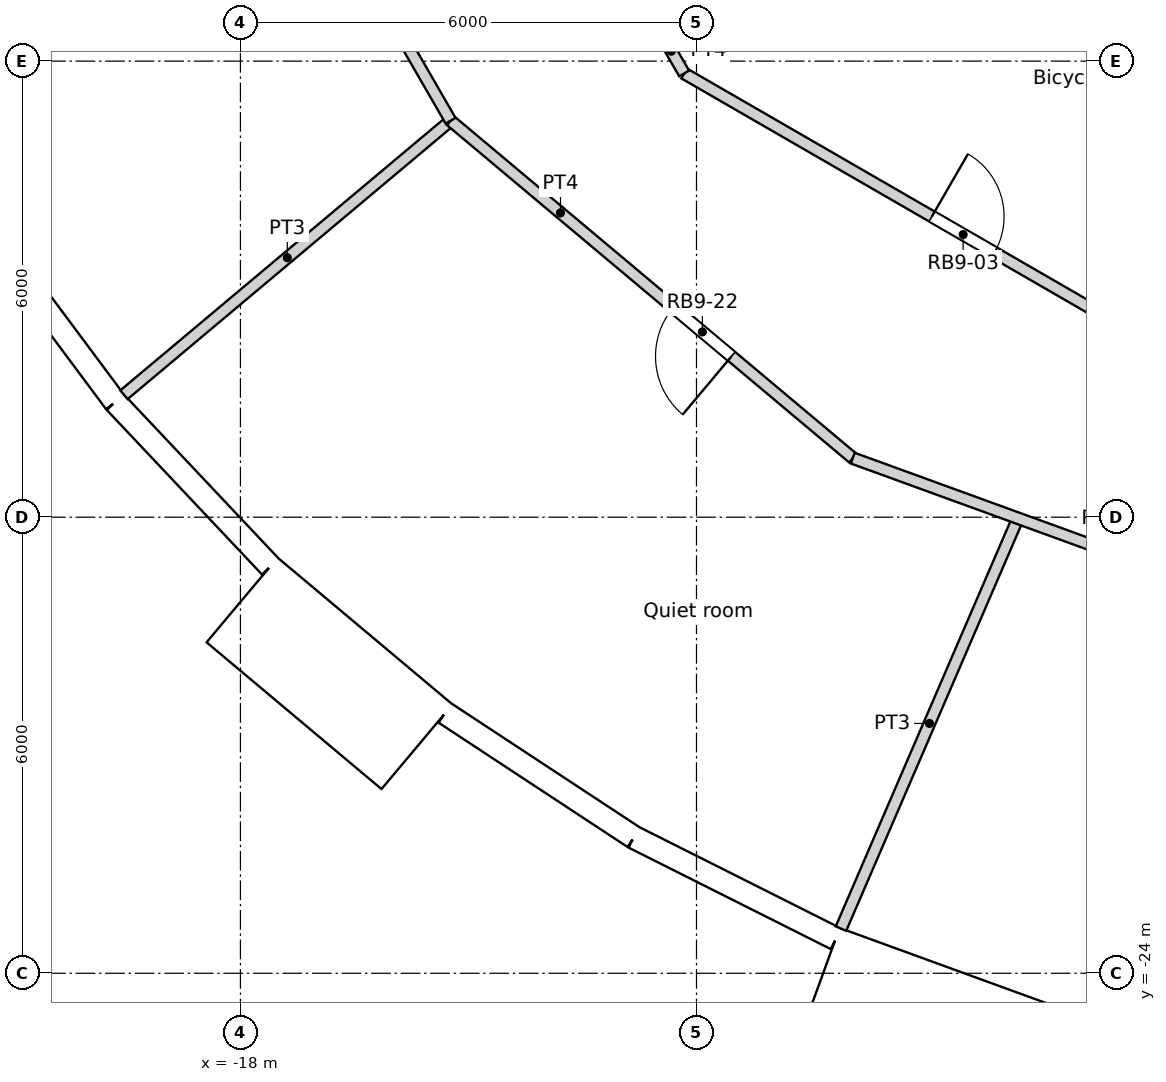
"""IFC4 building model, lengths in metres.
Left out: names, types, materials, properties, quantities, classifications, styles, units other than length and angle.
Written with IfcOpenShell. Run it as: python <this file> out.ifc"""

import sys

from ifc_helpers import new_model, si_unit, direction, frame, frame_2d, origin, origin_2d, place, context, subcontext, project, spatial, rectangle, circle, extrude, element, fill, save


model = new_model("IFC4")
c1 = context("Model", 3, precision=1e-05, world=origin(), true_north=direction((0.0, 1.0)))
c2 = subcontext(c1, "Body", "Model", "MODEL_VIEW")
j1 = project(units=[si_unit("LENGTHUNIT", "METRE"), si_unit("PLANEANGLEUNIT", "RADIAN")], contexts=[c1])
p1 = place(None, origin())
s1 = spatial("IfcSite", under=j1, at=p1, CompositionType="ELEMENT")
p2 = place(p1, origin())
s2 = spatial("IfcBuilding", under=s1, at=p2, CompositionType="ELEMENT")
p3 = place(p2, frame((0.0, 0.0, 212.4)))
s3 = spatial("IfcBuildingStorey", under=s2, at=p3, CompositionType="ELEMENT", Elevation=212.4)
for number, where, z_axis, x_axis in (
    (1, (-20.509, -13.489, 0.0), (0.0, 0.0, 1.0), (1.0, 0.0, 0.0)),
    (2, (-16.846, -17.855, 0.0), (0.0, 0.0, 1.0), (1.0, 0.0, 0.0)),
    (3, (-12.274, -21.259, 0.0), (0.0, 0.0, 1.0), (1.0, 0.0, 0.0)),
    (4, (-7.04, -23.516, 0.0), (0.0, 0.0, 1.0), (1.0, 0.0, 0.0)),
):
    element("IfcColumn", number, at=place(p3, frame(where, z_axis=z_axis, x_axis=x_axis)), inside=s3, PredefinedType="COLUMN", context=c2, shape_type="SweptSolid", body=[
        extrude(circle(Radius=0.6, at=origin_2d()), origin(), (0.0, 0.0, 1.0), 3.6),
    ])
for number, where, z_axis, x_axis in (
    (5, (-13.798, -12.802, 0.0), (0.0, 0.0, 1.0), (1.0, 0.0, 0.0)),
    (6, (-9.411, -16.301, 0.0), (0.0, 0.0, 1.0), (1.0, 0.0, 0.0)),
):
    element("IfcColumn", number, at=place(p3, frame(where, z_axis=z_axis, x_axis=x_axis)), inside=s3, PredefinedType="COLUMN", context=c2, shape_type="SweptSolid", body=[
        extrude(circle(Radius=0.65, at=origin_2d()), origin(), (0.0, 0.0, 1.0), 3.6),
    ])
p4 = place(p3, frame((-21.422, -14.101, 0.0), z_axis=(0.0, 0.0, 1.0), x_axis=(0.597197580538, -0.80209416517, 0.0)))
e7 = element("IfcWall", 7, at=p4, inside=s3, PredefinedType="SOLIDWALL", context=c2, shape_type="SweptSolid", body=[
    extrude(rectangle(XDim=2.973, YDim=0.3, at=frame_2d((1.486, 0.0))), origin(), (0.0, 0.0, 1.0), 3.3),
])
p5 = place(p4, frame((1.486, 0.0, 1.55)))
e8 = element("IfcOpeningElement", 8, at=p5, cuts=e7, PredefinedType="OPENING", context=c2, shape_type="SweptSolid", body=[
    extrude(circle(Radius=0.9, at=origin_2d()), frame((0.0, 0.16, 0.0), z_axis=(0.0, -1.0, 0.0), x_axis=(1.0, 0.0, 0.0)), (0.0, 0.0, 1.0), 0.32),
])
p6 = place(p3, frame((-19.647, -16.486, 0.0), z_axis=(0.0, 0.0, 1.0), x_axis=(0.686235184166, -0.727379730273, 0.0)))
e9 = element("IfcWall", 9, at=p6, inside=s3, PredefinedType="SOLIDWALL", context=c2, shape_type="SweptSolid", body=[
    extrude(rectangle(XDim=2.973, YDim=0.3, at=frame_2d((1.486, 0.0))), origin(), (0.0, 0.0, 1.0), 3.3),
])
p7 = place(p6, frame((1.486, 0.0, 1.55)))
e10 = element("IfcOpeningElement", 10, at=p7, cuts=e9, PredefinedType="OPENING", context=c2, shape_type="SweptSolid", body=[
    extrude(circle(Radius=0.9, at=origin_2d()), frame((0.0, 0.16, 0.0), z_axis=(0.0, -1.0, 0.0), x_axis=(1.0, 0.0, 0.0)), (0.0, 0.0, 1.0), 0.32),
])
p8 = place(p3, frame((-17.977, -19.09, -0.3), z_axis=(0.0, 0.0, 1.0), x_axis=(0.766022196139, -0.642814121673, 0.0)))
e11 = element("IfcWall", 11, at=p8, inside=s3, PredefinedType="ELEMENTEDWALL", context=c2, shape_type="SweptSolid", body=[
    extrude(rectangle(XDim=3.0, YDim=1.45, at=frame_2d((1.5, 0.0))), origin(), (0.0, 0.0, 1.0), 3.6),
])
p9 = place(p8, frame((1.5, 0.0, 1.85)))
e12 = element("IfcOpeningElement", 12, at=p9, cuts=e11, PredefinedType="OPENING", context=c2, shape_type="SweptSolid", body=[
    extrude(circle(Radius=0.9, at=origin_2d()), frame((0.0, 0.735, 0.0), z_axis=(0.0, -1.0, 0.0), x_axis=(1.0, 0.0, 0.0)), (0.0, 0.0, 1.0), 1.47),
])
p10 = place(p3, frame((-15.308, -20.578, 0.0), z_axis=(0.0, 0.0, 1.0), x_axis=(0.835470659512, -0.549535055382, 0.0)))
e13 = element("IfcWall", 13, at=p10, inside=s3, PredefinedType="SOLIDWALL", context=c2, shape_type="SweptSolid", body=[
    extrude(rectangle(XDim=2.973, YDim=0.3, at=frame_2d((1.487, 0.0))), origin(), (0.0, 0.0, 1.0), 3.3),
])
p11 = place(p10, frame((1.486, 0.0, 1.55)))
e14 = element("IfcOpeningElement", 14, at=p11, cuts=e13, PredefinedType="OPENING", context=c2, shape_type="SweptSolid", body=[
    extrude(circle(Radius=0.9, at=origin_2d()), frame((0.0, 0.16, 0.0), z_axis=(0.0, -1.0, 0.0), x_axis=(1.0, 0.0, 0.0)), (0.0, 0.0, 1.0), 0.32),
])
p12 = place(p3, frame((-12.824, -22.211, 0.0), z_axis=(0.0, 0.0, 1.0), x_axis=(0.893637442555, -0.448789618045, 0.0)))
e15 = element("IfcWall", 15, at=p12, inside=s3, PredefinedType="SOLIDWALL", context=c2, shape_type="SweptSolid", body=[
    extrude(rectangle(XDim=2.973, YDim=0.3, at=frame_2d((1.486, 0.0))), origin(), (0.0, 0.0, 1.0), 3.3),
])
p13 = place(p12, frame((1.486, 0.0, 1.55)))
e16 = element("IfcOpeningElement", 16, at=p13, cuts=e15, PredefinedType="OPENING", context=c2, shape_type="SweptSolid", body=[
    extrude(circle(Radius=0.9, at=origin_2d()), frame((0.0, 0.16, 0.0), z_axis=(0.0, -1.0, 0.0), x_axis=(1.0, 0.0, 0.0)), (0.0, 0.0, 1.0), 0.32),
])
p14 = place(p3, frame((-10.363, -24.087, -0.3), z_axis=(0.0, 0.0, 1.0), x_axis=(0.939686455819, -0.342037080957, 0.0)))
e17 = element("IfcWall", 17, at=p14, inside=s3, PredefinedType="ELEMENTEDWALL", context=c2, shape_type="SweptSolid", body=[
    extrude(rectangle(XDim=3.0, YDim=1.45, at=frame_2d((1.5, 0.0))), origin(), (0.0, 0.0, 1.0), 3.6),
])
p15 = place(p14, frame((1.5, 0.0, 1.85)))
e18 = element("IfcOpeningElement", 18, at=p15, cuts=e17, PredefinedType="OPENING", context=c2, shape_type="SweptSolid", body=[
    extrude(circle(Radius=0.9, at=origin_2d()), frame((0.0, 0.735, 0.0), z_axis=(0.0, -1.0, 0.0), x_axis=(1.0, 0.0, 0.0)), (0.0, 0.0, 1.0), 1.47),
])
p16 = place(p3, frame((-12.5, -11.577, 0.0), z_axis=(0.0, 0.0, 1.0), x_axis=(0.500024767483, -0.866011103799, 0.0)))
e19 = element("IfcWall", 19, at=p16, inside=s3, PredefinedType="PARTITIONING", context=c2, shape_type="SweptSolid", body=[
    extrude(rectangle(XDim=0.676, YDim=0.15, at=frame_2d((0.338, 0.0))), origin(), (0.0, 0.0, 1.0), 3.15),
])
p17 = place(p3, frame((-18.688, -6.802, 0.0), z_axis=(0.0, 0.0, 1.0), x_axis=(0.499914202267, -0.866074933462, 0.0)))
e20 = element("IfcWall", 20, at=p17, inside=s3, PredefinedType="PARTITIONING", context=c2, shape_type="SweptSolid", body=[
    extrude(rectangle(XDim=6.907, YDim=0.15, at=frame_2d((3.454, 0.0))), origin(), (0.0, 0.0, 1.0), 3.15),
])
p18 = place(p17, frame((3.003, 0.0, 0.0)))
e21 = element("IfcOpeningElement", 21, at=p18, cuts=e20, PredefinedType="OPENING", context=c2, shape_type="SweptSolid", body=[
    extrude(rectangle(XDim=1.8, YDim=2.1, at=frame_2d((0.9, 1.05))), frame((0.0, 0.075, 0.0), z_axis=(0.0, -1.0, 0.0), x_axis=(1.0, 0.0, 0.0)), (0.0, 0.0, 1.0), 0.15),
])
p19 = place(p3, frame((-15.235, -12.784, 0.0), z_axis=(0.0, 0.0, 1.0), x_axis=(0.766192104565, -0.642611592567, 0.0)))
e22 = element("IfcWall", 22, at=p19, inside=s3, PredefinedType="PARTITIONING", context=c2, shape_type="SweptSolid", body=[
    extrude(rectangle(XDim=6.906, YDim=0.15, at=frame_2d((3.453, 0.0))), origin(), (0.0, 0.0, 1.0), 3.15),
])
p20 = place(p19, frame((3.823, 0.0, 0.0)))
e23 = element("IfcOpeningElement", 23, at=p20, cuts=e22, PredefinedType="OPENING", context=c2, shape_type="SweptSolid", body=[
    extrude(rectangle(XDim=1.0, YDim=2.04, at=frame_2d((0.5, 1.02))), frame((0.0, 0.075, 0.0), z_axis=(0.0, -1.0, 0.0), x_axis=(1.0, 0.0, 0.0)), (0.0, 0.0, 1.0), 0.15),
])
p21 = place(p3, frame((-12.162, -12.162, 0.0), z_axis=(0.0, 0.0, 1.0), x_axis=(0.866004766557, -0.500035743023, 0.0)))
e24 = element("IfcWall", 24, at=p21, inside=s3, PredefinedType="PARTITIONING", context=c2, shape_type="SweptSolid", body=[
    extrude(rectangle(XDim=8.477, YDim=0.15, at=frame_2d((4.239, 0.0))), origin(), (0.0, 0.0, 1.0), 3.15),
])
p22 = place(p21, frame((3.763, 0.0, 0.0)))
e25 = element("IfcOpeningElement", 25, at=p22, cuts=e24, PredefinedType="OPENING", context=c2, shape_type="SweptSolid", body=[
    extrude(rectangle(XDim=0.95, YDim=2.1, at=frame_2d((0.475, 1.05))), frame((0.0, 0.075, 0.0), z_axis=(0.0, -1.0, 0.0), x_axis=(1.0, 0.0, 0.0)), (0.0, 0.0, 1.0), 0.15),
])
p23 = place(p3, frame((-9.944, -17.223, 0.0), z_axis=(0.0, 0.0, 1.0), x_axis=(0.939737689664, -0.341896292208, 0.0)))
e26 = element("IfcWall", 26, at=p23, inside=s3, PredefinedType="PARTITIONING", context=c2, shape_type="SweptSolid", body=[
    extrude(rectangle(XDim=6.908, YDim=0.15, at=frame_2d((3.454, 0.0))), origin(), (0.0, 0.0, 1.0), 3.15),
])
p24 = place(p3, frame((-19.532, -16.389, 0.0), z_axis=(0.0, 0.0, 1.0), x_axis=(0.76609059793, 0.642732600514, 0.0)))
e27 = element("IfcWall", 27, at=p24, inside=s3, PredefinedType="PARTITIONING", context=c2, shape_type="SweptSolid", body=[
    extrude(rectangle(XDim=5.609, YDim=0.15, at=frame_2d((2.804, 0.0))), origin(), (0.0, 0.0, 1.0), 3.15),
])
p25 = place(p3, frame((-10.099, -23.412, 0.0), z_axis=(0.0, 0.0, 1.0), x_axis=(0.39601833725, 0.918242602236, 0.0)))
e28 = element("IfcWall", 28, at=p25, inside=s3, PredefinedType="PARTITIONING", context=c2, shape_type="SweptSolid", body=[
    extrude(rectangle(XDim=5.879, YDim=0.15, at=frame_2d((2.939, 0.0))), origin(), (0.0, 0.0, 1.0), 3.15),
])
p26 = place(p5, origin())
e29 = element("IfcWindow", 29, at=p26, inside=s3, PartitioningType="SINGLE_PANEL", PredefinedType="WINDOW", context=c2, shape_type="SweptSolid", body=[
    extrude(circle(Radius=0.9, at=origin_2d()), frame((0.0, 0.12, 0.0), z_axis=(0.0, -1.0, 0.0), x_axis=(1.0, 0.0, 0.0)), (0.0, 0.0, 1.0), 0.1),
])
fill(e8, e29)
p27 = place(p7, origin())
e30 = element("IfcWindow", 30, at=p27, inside=s3, PartitioningType="SINGLE_PANEL", PredefinedType="WINDOW", context=c2, shape_type="SweptSolid", body=[
    extrude(circle(Radius=0.9, at=origin_2d()), frame((0.0, 0.12, 0.0), z_axis=(0.0, -1.0, 0.0), x_axis=(1.0, 0.0, 0.0)), (0.0, 0.0, 1.0), 0.1),
])
fill(e10, e30)
p28 = place(p9, origin())
e31 = element("IfcWindow", 31, at=p28, inside=s3, PartitioningType="SINGLE_PANEL", PredefinedType="WINDOW", context=c2, shape_type="SweptSolid", body=[
    extrude(circle(Radius=0.9, at=origin_2d()), frame((0.0, 0.695, 0.0), z_axis=(0.0, -1.0, 0.0), x_axis=(1.0, 0.0, 0.0)), (0.0, 0.0, 1.0), 0.1),
])
fill(e12, e31)
p29 = place(p11, origin())
e32 = element("IfcWindow", 32, at=p29, inside=s3, PartitioningType="SINGLE_PANEL", PredefinedType="WINDOW", context=c2, shape_type="SweptSolid", body=[
    extrude(circle(Radius=0.9, at=origin_2d()), frame((0.0, 0.12, 0.0), z_axis=(0.0, -1.0, 0.0), x_axis=(1.0, 0.0, 0.0)), (0.0, 0.0, 1.0), 0.1),
])
fill(e14, e32)
p30 = place(p13, origin())
e33 = element("IfcWindow", 33, at=p30, inside=s3, PartitioningType="SINGLE_PANEL", PredefinedType="WINDOW", context=c2, shape_type="SweptSolid", body=[
    extrude(circle(Radius=0.9, at=origin_2d()), frame((0.0, 0.12, 0.0), z_axis=(0.0, -1.0, 0.0), x_axis=(1.0, 0.0, 0.0)), (0.0, 0.0, 1.0), 0.1),
])
fill(e16, e33)
p31 = place(p15, origin())
e34 = element("IfcWindow", 34, at=p31, inside=s3, PartitioningType="SINGLE_PANEL", PredefinedType="WINDOW", context=c2, shape_type="SweptSolid", body=[
    extrude(circle(Radius=0.9, at=origin_2d()), frame((0.0, 0.695, 0.0), z_axis=(0.0, -1.0, 0.0), x_axis=(1.0, 0.0, 0.0)), (0.0, 0.0, 1.0), 0.1),
])
fill(e18, e34)
p32 = place(p22, origin())
e35 = element("IfcDoor", 35, at=p32, inside=s3, OperationType="SINGLE_SWING_LEFT", PredefinedType="DOOR", context=c2, shape_type="SweptSolid", body=[
    extrude(rectangle(XDim=0.95, YDim=2.1, at=frame_2d((0.475, 1.05))), frame((0.0, 0.025, 0.0), z_axis=(0.0, -1.0, 0.0), x_axis=(1.0, 0.0, 0.0)), (0.0, 0.0, 1.0), 0.05),
])
fill(e25, e35)
p33 = place(p20, origin())
e36 = element("IfcDoor", 36, at=p33, inside=s3, OperationType="SINGLE_SWING_LEFT", PredefinedType="DOOR", context=c2, shape_type="SweptSolid", body=[
    extrude(rectangle(XDim=1.0, YDim=2.04, at=frame_2d((0.5, 1.02))), frame((0.0, 0.025, 0.0), z_axis=(0.0, -1.0, 0.0), x_axis=(1.0, 0.0, 0.0)), (0.0, 0.0, 1.0), 0.05),
])
fill(e23, e36)
save(model, sys.argv[1])
